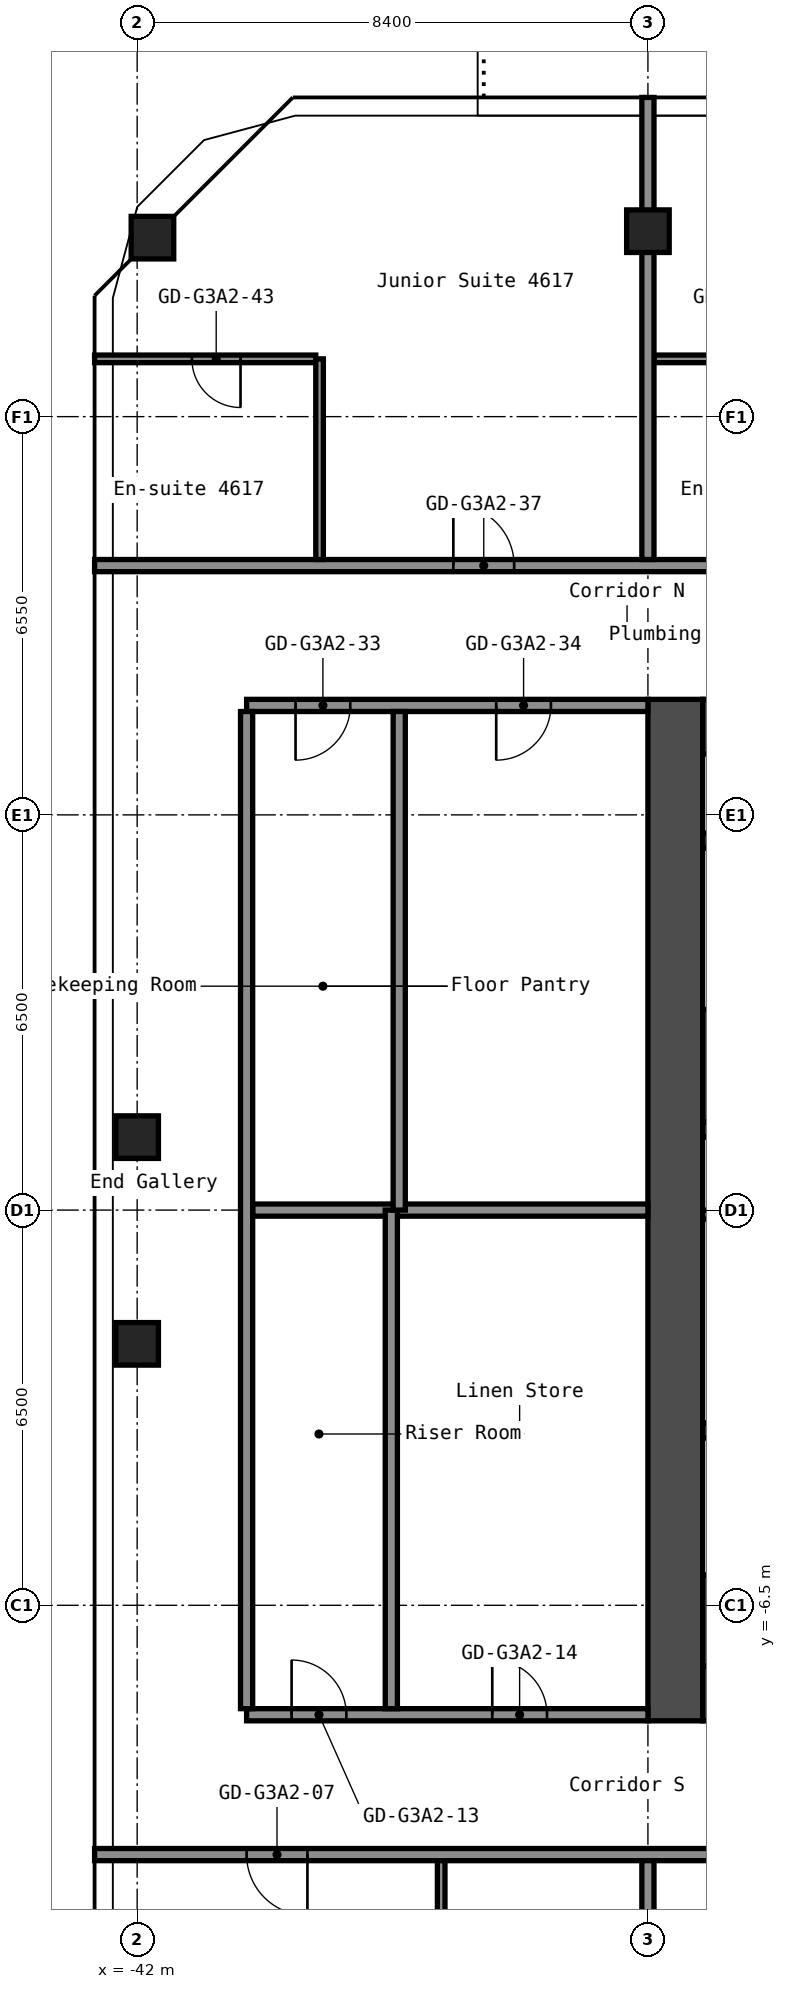
"""IFC4 building model, lengths in metres.
Left out: names, types, materials, properties, quantities, classifications, styles, units other than length and angle.
Written with IfcOpenShell. Run it as: python <this file> out.ifc"""

import sys

from ifc_helpers import new_model, si_unit, direction, frame, frame_2d, origin, origin_2d, place, context, subcontext, project, spatial, rectangle, hollow_rectangle, extrude, element, fill, save


model = new_model("IFC4")
c1 = context("Model", 3, precision=1e-05, world=origin(), true_north=direction((0.0, 1.0)))
c2 = subcontext(c1, "Body", "Model", "MODEL_VIEW")
j1 = project(units=[si_unit("LENGTHUNIT", "METRE"), si_unit("PLANEANGLEUNIT", "RADIAN")], contexts=[c1])
p1 = place(None, origin())
s1 = spatial("IfcSite", under=j1, at=p1, CompositionType="ELEMENT")
p2 = place(p1, origin())
s2 = spatial("IfcBuilding", under=s1, at=p2, CompositionType="ELEMENT")
p3 = place(p2, frame((0.0, 0.0, 163.0)))
s3 = spatial("IfcBuildingStorey", under=s2, at=p3, CompositionType="ELEMENT", Elevation=163.0)
for number, where, z_axis, x_axis in (
    (1, (-42.0, -2.2, 0.0), (0.0, 0.0, 1.0), (1.0, 0.0, 0.0)),
    (2, (-42.0, 1.2, 0.0), (0.0, 0.0, 1.0), (1.0, 0.0, 0.0)),
    (3, (-41.749, 15.994, 0.0), (0.0, 0.0, 1.0), (1.0, 0.0, 0.0)),
    (4, (-33.6, 16.1, 0.0), (0.0, 0.0, 1.0), (1.0, 0.0, 0.0)),
):
    element("IfcColumn", number, at=place(p3, frame(where, z_axis=z_axis, x_axis=x_axis)), inside=s3, PredefinedType="COLUMN", context=c2, shape_type="SweptSolid", body=[
        extrude(hollow_rectangle(XDim=0.7, YDim=0.7, WallThickness=0.028, at=origin_2d()), origin(), (0.0, 0.0, 1.0), 2.75),
    ])
p4 = place(p3, frame((-33.15, -8.4, 0.0), z_axis=(0.0, 0.0, 1.0), x_axis=(0.0, 1.0, 0.0)))
e5 = element("IfcWall", 5, at=p4, inside=s3, PredefinedType="SHEAR", context=c2, shape_type="SweptSolid", body=[
    extrude(rectangle(XDim=16.8, YDim=0.9, at=frame_2d((8.4, 0.0))), origin(), (0.0, 0.0, 1.0), 2.75),
])
p5 = place(p3, frame((-32.7, 7.95, 0.0), z_axis=(0.0, 0.0, 1.0), x_axis=(1.0, 0.0, 0.0)))
e6 = element("IfcWall", 6, at=p5, inside=s3, PredefinedType="SHEAR", context=c2, shape_type="SweptSolid", body=[
    extrude(rectangle(XDim=15.0, YDim=0.9, at=frame_2d((7.5, 0.0))), origin(), (0.0, 0.0, 1.0), 2.75),
])
p6 = place(p5, frame((3.4, 0.0, 0.0)))
e7 = element("IfcOpeningElement", 7, at=p6, cuts=e6, PredefinedType="OPENING", context=c2, shape_type="SweptSolid", body=[
    extrude(rectangle(XDim=1.2, YDim=2.1, at=frame_2d((0.6, 1.05))), frame((0.0, 0.46, 0.0), z_axis=(0.0, -1.0, 0.0), x_axis=(1.0, 0.0, 0.0)), (0.0, 0.0, 1.0), 0.92),
])
p7 = place(p5, frame((0.75, 0.0, 0.0)))
e8 = element("IfcOpeningElement", 8, at=p7, cuts=e6, PredefinedType="OPENING", context=c2, shape_type="SweptSolid", body=[
    extrude(rectangle(XDim=0.9, YDim=2.1, at=frame_2d((0.45, 1.05))), frame((0.0, 0.46, 0.0), z_axis=(0.0, -1.0, 0.0), x_axis=(1.0, 0.0, 0.0)), (0.0, 0.0, 1.0), 0.92),
])
p8 = place(p3, frame((-32.7, -7.95, 0.0), z_axis=(0.0, 0.0, 1.0), x_axis=(1.0, 0.0, 0.0)))
e9 = element("IfcWall", 9, at=p8, inside=s3, PredefinedType="SHEAR", context=c2, shape_type="SweptSolid", body=[
    extrude(rectangle(XDim=15.0, YDim=0.9, at=frame_2d((7.5, 0.0))), origin(), (0.0, 0.0, 1.0), 2.75),
])
p9 = place(p8, frame((11.45, 0.0, 0.0)))
e10 = element("IfcOpeningElement", 10, at=p9, cuts=e9, PredefinedType="OPENING", context=c2, shape_type="SweptSolid", body=[
    extrude(rectangle(XDim=1.0, YDim=2.1, at=frame_2d((0.5, 1.05))), frame((0.0, 0.46, 0.0), z_axis=(0.0, -1.0, 0.0), x_axis=(1.0, 0.0, 0.0)), (0.0, 0.0, 1.0), 0.92),
])
p10 = place(p3, frame((-32.7, 1.325, 0.0), z_axis=(0.0, 0.0, 1.0), x_axis=(1.0, 0.0, 0.0)))
e11 = element("IfcWall", 11, at=p10, inside=s3, PredefinedType="SHEAR", context=c2, shape_type="SweptSolid", body=[
    extrude(rectangle(XDim=5.05, YDim=0.25, at=frame_2d((2.525, 0.0))), origin(), (0.0, 0.0, 1.0), 2.75),
])
p11 = place(p10, frame((3.3, 0.0, 0.0)))
e12 = element("IfcOpeningElement", 12, at=p11, cuts=e11, PredefinedType="OPENING", context=c2, shape_type="SweptSolid", body=[
    extrude(rectangle(XDim=1.2, YDim=2.1, at=frame_2d((0.6, 1.05))), frame((0.0, 0.135, 0.0), z_axis=(0.0, -1.0, 0.0), x_axis=(1.0, 0.0, 0.0)), (0.0, 0.0, 1.0), 0.27),
])
p12 = place(p3, frame((-32.7, 2.375, 0.0), z_axis=(0.0, 0.0, 1.0), x_axis=(1.0, 0.0, 0.0)))
e13 = element("IfcWall", 13, at=p12, inside=s3, PredefinedType="SHEAR", context=c2, shape_type="SweptSolid", body=[
    extrude(rectangle(XDim=2.4, YDim=1.85, at=frame_2d((1.2, 0.0))), origin(), (0.0, 0.0, 1.0), 2.75),
])
p13 = place(p3, frame((-32.7, 6.075, 0.0), z_axis=(0.0, 0.0, 1.0), x_axis=(1.0, 0.0, 0.0)))
e14 = element("IfcWall", 14, at=p13, inside=s3, PredefinedType="SHEAR", context=c2, shape_type="SweptSolid", body=[
    extrude(rectangle(XDim=2.4, YDim=0.25, at=frame_2d((1.2, 0.0))), origin(), (0.0, 0.0, 1.0), 2.75),
])
p14 = place(p3, frame((-32.7, -3.625, 0.0), z_axis=(0.0, 0.0, 1.0), x_axis=(1.0, 0.0, 0.0)))
e15 = element("IfcWall", 15, at=p14, inside=s3, PredefinedType="SHEAR", context=c2, shape_type="SweptSolid", body=[
    extrude(rectangle(XDim=4.55, YDim=0.25, at=frame_2d((2.275, 0.0))), origin(), (0.0, 0.0, 1.0), 2.75),
])
p15 = place(p14, frame((2.85, 0.0, 0.0)))
e16 = element("IfcOpeningElement", 16, at=p15, cuts=e15, PredefinedType="OPENING", context=c2, shape_type="SweptSolid", body=[
    extrude(rectangle(XDim=1.1, YDim=2.1, at=frame_2d((0.55, 1.05))), frame((0.0, 0.135, 0.0), z_axis=(0.0, -1.0, 0.0), x_axis=(1.0, 0.0, 0.0)), (0.0, 0.0, 1.0), 0.27),
])
p16 = place(p14, frame((0.6, 0.0, 0.0)))
e17 = element("IfcOpeningElement", 17, at=p16, cuts=e15, PredefinedType="OPENING", context=c2, shape_type="SweptSolid", body=[
    extrude(rectangle(XDim=1.1, YDim=2.1, at=frame_2d((0.55, 1.05))), frame((0.0, 0.135, 0.0), z_axis=(0.0, -1.0, 0.0), x_axis=(1.0, 0.0, 0.0)), (0.0, 0.0, 1.0), 0.27),
])
p17 = place(p3, frame((-32.7, -6.75, 0.0), z_axis=(0.0, 0.0, 1.0), x_axis=(1.0, 0.0, 0.0)))
e18 = element("IfcWall", 18, at=p17, inside=s3, PredefinedType="SHEAR", context=c2, shape_type="SweptSolid", body=[
    extrude(rectangle(XDim=4.55, YDim=1.5, at=frame_2d((2.275, 0.0))), origin(), (0.0, 0.0, 1.0), 2.75),
])
p18 = place(p3, frame((-32.7, -0.075, 0.0), z_axis=(0.0, 0.0, 1.0), x_axis=(1.0, 0.0, 0.0)))
e19 = element("IfcWall", 19, at=p18, inside=s3, PredefinedType="PARTITIONING", context=c2, shape_type="SweptSolid", body=[
    extrude(rectangle(XDim=3.0, YDim=0.15, at=frame_2d((1.5, 0.0))), origin(), (0.0, 0.0, 1.0), 2.75),
])
p19 = place(p3, frame((-42.7, -10.6, 0.0), z_axis=(0.0, 0.0, 1.0), x_axis=(1.0, 0.0, 0.0)))
e20 = element("IfcWall", 20, at=p19, inside=s3, PredefinedType="PARTITIONING", context=c2, shape_type="SweptSolid", body=[
    extrude(rectangle(XDim=25.9, YDim=0.2, at=frame_2d((12.95, 0.0))), origin(), (0.0, 0.0, 1.0), 2.75),
])
p20 = place(p19, frame((2.5, 0.0, 0.0)))
e21 = element("IfcOpeningElement", 21, at=p20, cuts=e20, PredefinedType="OPENING", context=c2, shape_type="SweptSolid", body=[
    extrude(rectangle(XDim=1.0, YDim=2.1, at=frame_2d((0.5, 1.05))), frame((0.0, 0.11, 0.0), z_axis=(0.0, -1.0, 0.0), x_axis=(1.0, 0.0, 0.0)), (0.0, 0.0, 1.0), 0.22),
])
p21 = place(p19, frame((11.1, 0.0, 0.0)))
e22 = element("IfcOpeningElement", 22, at=p21, cuts=e20, PredefinedType="OPENING", context=c2, shape_type="SweptSolid", body=[
    extrude(rectangle(XDim=1.0, YDim=2.1, at=frame_2d((0.5, 1.05))), frame((0.0, 0.11, 0.0), z_axis=(0.0, -1.0, 0.0), x_axis=(1.0, 0.0, 0.0)), (0.0, 0.0, 1.0), 0.22),
])
p22 = place(p19, frame((19.5, 0.0, 0.0)))
e23 = element("IfcOpeningElement", 23, at=p22, cuts=e20, PredefinedType="OPENING", context=c2, shape_type="SweptSolid", body=[
    extrude(rectangle(XDim=1.0, YDim=2.1, at=frame_2d((0.5, 1.05))), frame((0.0, 0.11, 0.0), z_axis=(0.0, -1.0, 0.0), x_axis=(1.0, 0.0, 0.0)), (0.0, 0.0, 1.0), 0.22),
])
p23 = place(p3, frame((-40.2, -8.3, 0.0), z_axis=(0.0, 0.0, 1.0), x_axis=(1.0, 0.0, 0.0)))
e24 = element("IfcWall", 24, at=p23, inside=s3, PredefinedType="PARTITIONING", context=c2, shape_type="SweptSolid", body=[
    extrude(rectangle(XDim=6.6, YDim=0.2, at=frame_2d((3.3, 0.0))), origin(), (0.0, 0.0, 1.0), 2.75),
])
p24 = place(p23, frame((0.74, 0.0, 0.0)))
e25 = element("IfcOpeningElement", 25, at=p24, cuts=e24, PredefinedType="OPENING", context=c2, shape_type="SweptSolid", body=[
    extrude(rectangle(XDim=0.9, YDim=2.1, at=frame_2d((0.45, 1.05))), frame((0.0, 0.11, 0.0), z_axis=(0.0, -1.0, 0.0), x_axis=(1.0, 0.0, 0.0)), (0.0, 0.0, 1.0), 0.22),
])
p25 = place(p23, frame((4.04, 0.0, 0.0)))
e26 = element("IfcOpeningElement", 26, at=p25, cuts=e24, PredefinedType="OPENING", context=c2, shape_type="SweptSolid", body=[
    extrude(rectangle(XDim=0.9, YDim=2.1, at=frame_2d((0.45, 1.05))), frame((0.0, 0.11, 0.0), z_axis=(0.0, -1.0, 0.0), x_axis=(1.0, 0.0, 0.0)), (0.0, 0.0, 1.0), 0.22),
])
p26 = place(p3, frame((-40.1, 0.0, 0.0), z_axis=(0.0, 0.0, 1.0), x_axis=(1.0, 0.0, 0.0)))
e27 = element("IfcWall", 27, at=p26, inside=s3, PredefinedType="PARTITIONING", context=c2, shape_type="SweptSolid", body=[
    extrude(rectangle(XDim=6.5, YDim=0.2, at=frame_2d((3.25, 0.0))), origin(), (0.0, 0.0, 1.0), 2.75),
])
p27 = place(p3, frame((-40.2, 8.3, 0.0), z_axis=(0.0, 0.0, 1.0), x_axis=(1.0, 0.0, 0.0)))
e28 = element("IfcWall", 28, at=p27, inside=s3, PredefinedType="PARTITIONING", context=c2, shape_type="SweptSolid", body=[
    extrude(rectangle(XDim=6.6, YDim=0.2, at=frame_2d((3.3, 0.0))), origin(), (0.0, 0.0, 1.0), 2.75),
])
p28 = place(p27, frame((0.805, 0.0, 0.0)))
e29 = element("IfcOpeningElement", 29, at=p28, cuts=e28, PredefinedType="OPENING", context=c2, shape_type="SweptSolid", body=[
    extrude(rectangle(XDim=0.9, YDim=2.1, at=frame_2d((0.45, 1.05))), frame((0.0, 0.11, 0.0), z_axis=(0.0, -1.0, 0.0), x_axis=(1.0, 0.0, 0.0)), (0.0, 0.0, 1.0), 0.22),
])
p29 = place(p27, frame((4.105, 0.0, 0.0)))
e30 = element("IfcOpeningElement", 30, at=p29, cuts=e28, PredefinedType="OPENING", context=c2, shape_type="SweptSolid", body=[
    extrude(rectangle(XDim=0.9, YDim=2.1, at=frame_2d((0.45, 1.05))), frame((0.0, 0.11, 0.0), z_axis=(0.0, -1.0, 0.0), x_axis=(1.0, 0.0, 0.0)), (0.0, 0.0, 1.0), 0.22),
])
p30 = place(p3, frame((-42.7, 10.6, 0.0), z_axis=(0.0, 0.0, 1.0), x_axis=(1.0, 0.0, 0.0)))
e31 = element("IfcWall", 31, at=p30, inside=s3, PredefinedType="PARTITIONING", context=c2, shape_type="SweptSolid", body=[
    extrude(rectangle(XDim=25.9, YDim=0.2, at=frame_2d((12.95, 0.0))), origin(), (0.0, 0.0, 1.0), 2.75),
])
p31 = place(p30, frame((5.9, 0.0, 0.0)))
e32 = element("IfcOpeningElement", 32, at=p31, cuts=e31, PredefinedType="OPENING", context=c2, shape_type="SweptSolid", body=[
    extrude(rectangle(XDim=1.0, YDim=2.1, at=frame_2d((0.5, 1.05))), frame((0.0, 0.11, 0.0), z_axis=(0.0, -1.0, 0.0), x_axis=(1.0, 0.0, 0.0)), (0.0, 0.0, 1.0), 0.22),
])
p32 = place(p30, frame((14.5, 0.0, 0.0)))
e33 = element("IfcOpeningElement", 33, at=p32, cuts=e31, PredefinedType="OPENING", context=c2, shape_type="SweptSolid", body=[
    extrude(rectangle(XDim=1.0, YDim=2.1, at=frame_2d((0.5, 1.05))), frame((0.0, 0.11, 0.0), z_axis=(0.0, -1.0, 0.0), x_axis=(1.0, 0.0, 0.0)), (0.0, 0.0, 1.0), 0.22),
])
p33 = place(p30, frame((22.9, 0.0, 0.0)))
e34 = element("IfcOpeningElement", 34, at=p33, cuts=e31, PredefinedType="OPENING", context=c2, shape_type="SweptSolid", body=[
    extrude(rectangle(XDim=1.0, YDim=2.1, at=frame_2d((0.5, 1.05))), frame((0.0, 0.11, 0.0), z_axis=(0.0, -1.0, 0.0), x_axis=(1.0, 0.0, 0.0)), (0.0, 0.0, 1.0), 0.22),
])
p34 = place(p3, frame((-42.7, 14.0, 0.0), z_axis=(0.0, 0.0, 1.0), x_axis=(1.0, 0.0, 0.0)))
e35 = element("IfcWall", 35, at=p34, inside=s3, PredefinedType="PARTITIONING", context=c2, shape_type="SweptSolid", body=[
    extrude(rectangle(XDim=3.637, YDim=0.125, at=frame_2d((1.819, 0.0))), origin(), (0.0, 0.0, 1.0), 2.75),
])
p35 = place(p34, frame((1.6, 0.0, 0.0)))
e36 = element("IfcOpeningElement", 36, at=p35, cuts=e35, PredefinedType="OPENING", context=c2, shape_type="SweptSolid", body=[
    extrude(rectangle(XDim=0.8, YDim=2.1, at=frame_2d((0.4, 1.05))), frame((0.0, 0.073, 0.0), z_axis=(0.0, -1.0, 0.0), x_axis=(1.0, 0.0, 0.0)), (0.0, 0.0, 1.0), 0.145),
])
p36 = place(p3, frame((-33.5, 14.0, 0.0), z_axis=(0.0, 0.0, 1.0), x_axis=(1.0, 0.0, 0.0)))
e37 = element("IfcWall", 37, at=p36, inside=s3, PredefinedType="PARTITIONING", context=c2, shape_type="SweptSolid", body=[
    extrude(rectangle(XDim=3.238, YDim=0.125, at=frame_2d((1.619, 0.0))), origin(), (0.0, 0.0, 1.0), 2.75),
])
p37 = place(p36, frame((1.2, 0.0, 0.0)))
e38 = element("IfcOpeningElement", 38, at=p37, cuts=e37, PredefinedType="OPENING", context=c2, shape_type="SweptSolid", body=[
    extrude(rectangle(XDim=0.8, YDim=2.1, at=frame_2d((0.4, 1.05))), frame((0.0, 0.073, 0.0), z_axis=(0.0, -1.0, 0.0), x_axis=(1.0, 0.0, 0.0)), (0.0, 0.0, 1.0), 0.145),
])
p38 = place(p3, frame((-40.2, -8.2, 0.0), z_axis=(0.0, 0.0, 1.0), x_axis=(0.0, 1.0, 0.0)))
e39 = element("IfcWall", 39, at=p38, inside=s3, PredefinedType="PARTITIONING", context=c2, shape_type="SweptSolid", body=[
    extrude(rectangle(XDim=16.4, YDim=0.2, at=frame_2d((8.2, 0.0))), origin(), (0.0, 0.0, 1.0), 2.75),
])
p39 = place(p3, frame((-39.0, 10.7, 0.0), z_axis=(0.0, 0.0, 1.0), x_axis=(0.0, 1.0, 0.0)))
e40 = element("IfcWall", 40, at=p39, inside=s3, PredefinedType="PARTITIONING", context=c2, shape_type="SweptSolid", body=[
    extrude(rectangle(XDim=3.3, YDim=0.125, at=frame_2d((1.65, 0.0))), origin(), (0.0, 0.0, 1.0), 2.75),
])
for number, where, z_axis, x_axis in (
    (41, (-37.82, -8.2, 0.0), (0.0, 0.0, 1.0), (0.0, 1.0, 0.0)),
    (42, (-37.69, 0.0, 0.0), (0.0, 0.0, 1.0), (0.0, 1.0, 0.0)),
):
    element("IfcWall", number, at=place(p3, frame(where, z_axis=z_axis, x_axis=x_axis)), inside=s3, PredefinedType="PARTITIONING", context=c2, shape_type="SweptSolid", body=[
        extrude(rectangle(XDim=8.2, YDim=0.2, at=frame_2d((4.1, 0.0))), origin(), (0.0, 0.0, 1.0), 2.75),
    ])
p40 = place(p3, frame((-37.0, -14.0, 0.0), z_axis=(0.0, 0.0, 1.0), x_axis=(0.0, 1.0, 0.0)))
e43 = element("IfcWall", 43, at=p40, inside=s3, PredefinedType="PARTITIONING", context=c2, shape_type="SweptSolid", body=[
    extrude(rectangle(XDim=3.3, YDim=0.125, at=frame_2d((1.65, 0.0))), origin(), (0.0, 0.0, 1.0), 2.75),
])
p41 = place(p3, frame((-33.6, -19.3, 0.0), z_axis=(0.0, 0.0, 1.0), x_axis=(0.0, 1.0, 0.0)))
e44 = element("IfcWall", 44, at=p41, inside=s3, PredefinedType="PARTITIONING", context=c2, shape_type="SweptSolid", body=[
    extrude(rectangle(XDim=8.6, YDim=0.2, at=frame_2d((4.3, 0.0))), origin(), (0.0, 0.0, 1.0), 2.75),
])
p42 = place(p3, frame((-33.6, 10.7, 0.0), z_axis=(0.0, 0.0, 1.0), x_axis=(0.0, 1.0, 0.0)))
e45 = element("IfcWall", 45, at=p42, inside=s3, PredefinedType="PARTITIONING", context=c2, shape_type="SweptSolid", body=[
    extrude(rectangle(XDim=7.6, YDim=0.2, at=frame_2d((3.8, 0.0))), origin(), (0.0, 0.0, 1.0), 2.75),
])
p43 = place(p20, origin())
e46 = element("IfcDoor", 46, at=p43, inside=s3, OperationType="SINGLE_SWING_RIGHT", PredefinedType="DOOR", context=c2, shape_type="SweptSolid", body=[
    extrude(rectangle(XDim=1.0, YDim=2.1, at=frame_2d((0.5, 1.05))), frame((0.0, 0.025, 0.0), z_axis=(0.0, -1.0, 0.0), x_axis=(1.0, 0.0, 0.0)), (0.0, 0.0, 1.0), 0.05),
])
fill(e21, e46)
p44 = place(p24, origin())
e47 = element("IfcDoor", 47, at=p44, inside=s3, OperationType="SINGLE_SWING_RIGHT", PredefinedType="DOOR", context=c2, shape_type="SweptSolid", body=[
    extrude(rectangle(XDim=0.9, YDim=2.1, at=frame_2d((0.45, 1.05))), frame((0.0, 0.025, 0.0), z_axis=(0.0, -1.0, 0.0), x_axis=(1.0, 0.0, 0.0)), (0.0, 0.0, 1.0), 0.05),
])
fill(e25, e47)
p45 = place(p25, origin())
e48 = element("IfcDoor", 48, at=p45, inside=s3, OperationType="SINGLE_SWING_RIGHT", PredefinedType="DOOR", context=c2, shape_type="SweptSolid", body=[
    extrude(rectangle(XDim=0.9, YDim=2.1, at=frame_2d((0.45, 1.05))), frame((0.0, 0.025, 0.0), z_axis=(0.0, -1.0, 0.0), x_axis=(1.0, 0.0, 0.0)), (0.0, 0.0, 1.0), 0.05),
])
fill(e26, e48)
p46 = place(p28, origin())
e49 = element("IfcDoor", 49, at=p46, inside=s3, OperationType="SINGLE_SWING_LEFT", PredefinedType="DOOR", context=c2, shape_type="SweptSolid", body=[
    extrude(rectangle(XDim=0.9, YDim=2.1, at=frame_2d((0.45, 1.05))), frame((0.0, 0.025, 0.0), z_axis=(0.0, -1.0, 0.0), x_axis=(1.0, 0.0, 0.0)), (0.0, 0.0, 1.0), 0.05),
])
fill(e29, e49)
p47 = place(p29, origin())
e50 = element("IfcDoor", 50, at=p47, inside=s3, OperationType="SINGLE_SWING_LEFT", PredefinedType="DOOR", context=c2, shape_type="SweptSolid", body=[
    extrude(rectangle(XDim=0.9, YDim=2.1, at=frame_2d((0.45, 1.05))), frame((0.0, 0.025, 0.0), z_axis=(0.0, -1.0, 0.0), x_axis=(1.0, 0.0, 0.0)), (0.0, 0.0, 1.0), 0.05),
])
fill(e30, e50)
p48 = place(p31, origin())
e51 = element("IfcDoor", 51, at=p48, inside=s3, OperationType="SINGLE_SWING_RIGHT", PredefinedType="DOOR", context=c2, shape_type="SweptSolid", body=[
    extrude(rectangle(XDim=1.0, YDim=2.1, at=frame_2d((0.5, 1.05))), frame((0.0, 0.025, 0.0), z_axis=(0.0, -1.0, 0.0), x_axis=(1.0, 0.0, 0.0)), (0.0, 0.0, 1.0), 0.05),
])
fill(e32, e51)
p49 = place(p35, origin())
e52 = element("IfcDoor", 52, at=p49, inside=s3, OperationType="SINGLE_SWING_RIGHT", PredefinedType="DOOR", context=c2, shape_type="SweptSolid", body=[
    extrude(rectangle(XDim=0.8, YDim=2.1, at=frame_2d((0.4, 1.05))), frame((0.0, 0.025, 0.0), z_axis=(0.0, -1.0, 0.0), x_axis=(1.0, 0.0, 0.0)), (0.0, 0.0, 1.0), 0.05),
])
fill(e36, e52)
save(model, sys.argv[1])
